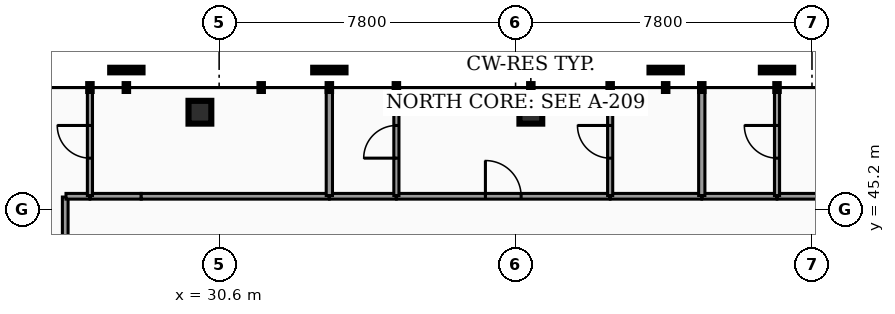
"""IFC4 building model, lengths in metres.
Left out: names, types, materials, properties, quantities, classifications, styles, units other than length and angle.
Written with IfcOpenShell. Run it as: python <this file> out.ifc"""

import sys

from ifc_helpers import new_model, si_unit, direction, frame, frame_2d, origin, origin_2d, place, context, subcontext, project, spatial, rectangle, hollow_rectangle, extrude, element, fill, save


model = new_model("IFC4")
c1 = context("Model", 3, precision=1e-05, world=origin(), true_north=direction((0.0, 1.0)))
c2 = subcontext(c1, "Body", "Model", "MODEL_VIEW")
j1 = project(units=[si_unit("LENGTHUNIT", "METRE"), si_unit("PLANEANGLEUNIT", "RADIAN")], contexts=[c1])
p1 = place(None, origin())
s1 = spatial("IfcSite", under=j1, at=p1, CompositionType="ELEMENT")
p2 = place(p1, origin())
s2 = spatial("IfcBuilding", under=s1, at=p2, CompositionType="ELEMENT")
p3 = place(p2, frame((0.0, 0.0, 208.76)))
s3 = spatial("IfcBuildingStorey", under=s2, at=p3, CompositionType="ELEMENT", Elevation=208.76)
for number, where, z_axis, x_axis in (
    (1, (38.802, 47.761, 0.0), (0.0, 0.0, 1.0), (1.0, 0.0, 0.0)),
    (2, (30.094, 47.761, 0.0), (0.0, 0.0, 1.0), (1.0, 0.0, 0.0)),
):
    element("IfcColumn", number, at=place(p3, frame(where, z_axis=z_axis, x_axis=x_axis)), inside=s3, PredefinedType="COLUMN", context=c2, shape_type="SweptSolid", body=[
        extrude(hollow_rectangle(XDim=0.6, YDim=0.6, WallThickness=0.03, at=origin_2d()), origin(), (0.0, 0.0, 1.0), 3.18),
    ])
p4 = place(p3, frame((26.55, 43.55, 0.0), z_axis=(0.0, 0.0, 1.0), x_axis=(0.0, 1.0, 0.0)))
e3 = element("IfcWall", 3, at=p4, inside=s3, PredefinedType="PARTITIONING", context=c2, shape_type="SweptSolid", body=[
    extrude(rectangle(XDim=1.98, YDim=0.15, at=frame_2d((0.99, 0.0))), origin(), (0.0, 0.0, 1.0), 2.235),
])
p5 = place(p3, frame((26.57, 45.55, 0.0), z_axis=(0.0, 0.0, 1.0), x_axis=(1.0, 0.0, 0.0)))
e4 = element("IfcWall", 4, at=p5, inside=s3, PredefinedType="PARTITIONING", context=c2, shape_type="SweptSolid", body=[
    extrude(rectangle(XDim=0.625, YDim=0.15, at=frame_2d((0.312, 0.0))), origin(), (0.0, 0.0, 1.0), 2.235),
])
p6 = place(p3, frame((27.205, 45.55, 0.0), z_axis=(0.0, 0.0, 1.0), x_axis=(1.0, 0.0, 0.0)))
e5 = element("IfcWall", 5, at=p6, inside=s3, PredefinedType="PARTITIONING", context=c2, shape_type="SweptSolid", body=[
    extrude(rectangle(XDim=1.345, YDim=0.15, at=frame_2d((0.672, 0.0))), origin(), (0.0, 0.0, 1.0), 2.235),
])
p7 = place(p3, frame((28.55, 45.55, 0.0), z_axis=(0.0, 0.0, 1.0), x_axis=(1.0, 0.0, 0.0)))
e6 = element("IfcWall", 6, at=p7, inside=s3, PredefinedType="PARTITIONING", context=c2, shape_type="SweptSolid", body=[
    extrude(rectangle(XDim=4.945, YDim=0.15, at=frame_2d((2.473, 0.0))), origin(), (0.0, 0.0, 1.0), 2.235),
])
p8 = place(p3, frame((45.285, 45.55, 0.0), z_axis=(0.0, 0.0, 1.0), x_axis=(1.0, 0.0, 0.0)))
e7 = element("IfcWall", 7, at=p8, inside=s3, PredefinedType="PARTITIONING", context=c2, shape_type="SweptSolid", body=[
    extrude(rectangle(XDim=3.065, YDim=0.15, at=frame_2d((1.533, 0.0))), origin(), (0.0, 0.0, 1.0), 2.235),
])
p9 = place(p3, frame((43.305, 45.55, 0.0), z_axis=(0.0, 0.0, 1.0), x_axis=(1.0, 0.0, 0.0)))
e8 = element("IfcWall", 8, at=p9, inside=s3, PredefinedType="PARTITIONING", context=c2, shape_type="SweptSolid", body=[
    extrude(rectangle(XDim=1.97, YDim=0.15, at=frame_2d((0.985, 0.0))), origin(), (0.0, 0.0, 1.0), 2.235),
])
p10 = place(p3, frame((35.269, 45.55, 0.0), z_axis=(0.0, 0.0, 1.0), x_axis=(1.0, 0.0, 0.0)))
e9 = element("IfcWall", 9, at=p10, inside=s3, PredefinedType="PARTITIONING", context=c2, shape_type="SweptSolid", body=[
    extrude(rectangle(XDim=5.615, YDim=0.15, at=frame_2d((2.808, 0.0))), origin(), (0.0, 0.0, 1.0), 2.235),
])
p11 = place(p10, frame((2.338, 0.0, 0.0)))
e10 = element("IfcOpeningElement", 10, at=p11, cuts=e9, PredefinedType="OPENING", context=c2, shape_type="SweptSolid", body=[
    extrude(rectangle(XDim=0.94, YDim=2.05, at=frame_2d((0.47, 1.025))), frame((0.0, 0.085, 0.0), z_axis=(0.0, -1.0, 0.0), x_axis=(1.0, 0.0, 0.0)), (0.0, 0.0, 1.0), 0.17),
])
p12 = place(p3, frame((40.894, 45.55, 0.0), z_axis=(0.0, 0.0, 1.0), x_axis=(1.0, 0.0, 0.0)))
e11 = element("IfcWall", 11, at=p12, inside=s3, PredefinedType="PARTITIONING", context=c2, shape_type="SweptSolid", body=[
    extrude(rectangle(XDim=2.401, YDim=0.15, at=frame_2d((1.2, 0.0))), origin(), (0.0, 0.0, 1.0), 2.235),
])
p13 = place(p3, frame((33.505, 45.55, 0.0), z_axis=(0.0, 0.0, 1.0), x_axis=(1.0, 0.0, 0.0)))
e12 = element("IfcWall", 12, at=p13, inside=s3, PredefinedType="PARTITIONING", context=c2, shape_type="SweptSolid", body=[
    extrude(rectangle(XDim=1.754, YDim=0.15, at=frame_2d((0.877, 0.0))), origin(), (0.0, 0.0, 1.0), 2.235),
])
p14 = place(p3, frame((27.2, 45.57, 0.0), z_axis=(0.0, 0.0, 1.0), x_axis=(0.0, 1.0, 0.0)))
e13 = element("IfcWall", 13, at=p14, inside=s3, PredefinedType="PARTITIONING", context=c2, shape_type="SweptSolid", body=[
    extrude(rectangle(XDim=2.826, YDim=0.135, at=frame_2d((1.413, 0.0))), origin(), (0.0, 0.0, 1.0), 2.235),
])
p15 = place(p14, frame((0.983, 0.0, 0.0)))
e14 = element("IfcOpeningElement", 14, at=p15, cuts=e13, PredefinedType="OPENING", context=c2, shape_type="SweptSolid", body=[
    extrude(rectangle(XDim=0.86, YDim=2.05, at=frame_2d((0.43, 1.025))), frame((0.0, 0.077, 0.0), z_axis=(0.0, -1.0, 0.0), x_axis=(1.0, 0.0, 0.0)), (0.0, 0.0, 1.0), 0.155),
])
p16 = place(p3, frame((33.5, 45.57, 0.0), z_axis=(0.0, 0.0, 1.0), x_axis=(0.0, 1.0, 0.0)))
e15 = element("IfcWall", 15, at=p16, inside=s3, PredefinedType="PARTITIONING", context=c2, shape_type="SweptSolid", body=[
    extrude(rectangle(XDim=2.826, YDim=0.165, at=frame_2d((1.413, 0.0))), origin(), (0.0, 0.0, 1.0), 2.235),
])
p17 = place(p3, frame((45.28, 45.57, 0.0), z_axis=(0.0, 0.0, 1.0), x_axis=(0.0, 1.0, 0.0)))
e16 = element("IfcWall", 16, at=p17, inside=s3, PredefinedType="PARTITIONING", context=c2, shape_type="SweptSolid", body=[
    extrude(rectangle(XDim=2.826, YDim=0.135, at=frame_2d((1.413, 0.0))), origin(), (0.0, 0.0, 1.0), 2.235),
])
p18 = place(p17, frame((0.983, 0.0, 0.0)))
e17 = element("IfcOpeningElement", 17, at=p18, cuts=e16, PredefinedType="OPENING", context=c2, shape_type="SweptSolid", body=[
    extrude(rectangle(XDim=0.86, YDim=2.05, at=frame_2d((0.43, 1.025))), frame((0.0, 0.077, 0.0), z_axis=(0.0, -1.0, 0.0), x_axis=(1.0, 0.0, 0.0)), (0.0, 0.0, 1.0), 0.155),
])
p19 = place(p3, frame((43.3, 45.57, 0.0), z_axis=(0.0, 0.0, 1.0), x_axis=(0.0, 1.0, 0.0)))
e18 = element("IfcWall", 18, at=p19, inside=s3, PredefinedType="PARTITIONING", context=c2, shape_type="SweptSolid", body=[
    extrude(rectangle(XDim=2.826, YDim=0.165, at=frame_2d((1.413, 0.0))), origin(), (0.0, 0.0, 1.0), 2.235),
])
p20 = place(p3, frame((40.889, 45.57, 0.0), z_axis=(0.0, 0.0, 1.0), x_axis=(0.0, 1.0, 0.0)))
e19 = element("IfcWall", 19, at=p20, inside=s3, PredefinedType="PARTITIONING", context=c2, shape_type="SweptSolid", body=[
    extrude(rectangle(XDim=2.826, YDim=0.135, at=frame_2d((1.413, 0.0))), origin(), (0.0, 0.0, 1.0), 2.235),
])
p21 = place(p20, frame((0.983, 0.0, 0.0)))
e20 = element("IfcOpeningElement", 20, at=p21, cuts=e19, PredefinedType="OPENING", context=c2, shape_type="SweptSolid", body=[
    extrude(rectangle(XDim=0.86, YDim=2.05, at=frame_2d((0.43, 1.025))), frame((0.0, 0.077, 0.0), z_axis=(0.0, -1.0, 0.0), x_axis=(1.0, 0.0, 0.0)), (0.0, 0.0, 1.0), 0.155),
])
p22 = place(p3, frame((35.264, 45.57, 0.0), z_axis=(0.0, 0.0, 1.0), x_axis=(0.0, 1.0, 0.0)))
e21 = element("IfcWall", 21, at=p22, inside=s3, PredefinedType="PARTITIONING", context=c2, shape_type="SweptSolid", body=[
    extrude(rectangle(XDim=2.826, YDim=0.135, at=frame_2d((1.413, 0.0))), origin(), (0.0, 0.0, 1.0), 2.235),
])
p23 = place(p22, frame((0.983, 0.0, 0.0)))
e22 = element("IfcOpeningElement", 22, at=p23, cuts=e21, PredefinedType="OPENING", context=c2, shape_type="SweptSolid", body=[
    extrude(rectangle(XDim=0.86, YDim=2.05, at=frame_2d((0.43, 1.025))), frame((0.0, 0.077, 0.0), z_axis=(0.0, -1.0, 0.0), x_axis=(1.0, 0.0, 0.0)), (0.0, 0.0, 1.0), 0.155),
])
p24 = place(p11, origin())
e23 = element("IfcDoor", 23, at=p24, inside=s3, OperationType="SINGLE_SWING_LEFT", PredefinedType="DOOR", context=c2, shape_type="SweptSolid", body=[
    extrude(rectangle(XDim=0.94, YDim=2.05, at=frame_2d((0.47, 1.025))), frame((0.0, 0.025, 0.0), z_axis=(0.0, -1.0, 0.0), x_axis=(1.0, 0.0, 0.0)), (0.0, 0.0, 1.0), 0.05),
])
fill(e10, e23)
p25 = place(p15, origin())
e24 = element("IfcDoor", 24, at=p25, inside=s3, OperationType="SINGLE_SWING_RIGHT", PredefinedType="DOOR", context=c2, shape_type="SweptSolid", body=[
    extrude(rectangle(XDim=0.86, YDim=2.05, at=frame_2d((0.43, 1.025))), frame((0.0, 0.025, 0.0), z_axis=(0.0, -1.0, 0.0), x_axis=(1.0, 0.0, 0.0)), (0.0, 0.0, 1.0), 0.05),
])
fill(e14, e24)
p26 = place(p18, origin())
e25 = element("IfcDoor", 25, at=p26, inside=s3, OperationType="SINGLE_SWING_RIGHT", PredefinedType="DOOR", context=c2, shape_type="SweptSolid", body=[
    extrude(rectangle(XDim=0.86, YDim=2.05, at=frame_2d((0.43, 1.025))), frame((0.0, 0.025, 0.0), z_axis=(0.0, -1.0, 0.0), x_axis=(1.0, 0.0, 0.0)), (0.0, 0.0, 1.0), 0.05),
])
fill(e17, e25)
p27 = place(p21, origin())
e26 = element("IfcDoor", 26, at=p27, inside=s3, OperationType="SINGLE_SWING_RIGHT", PredefinedType="DOOR", context=c2, shape_type="SweptSolid", body=[
    extrude(rectangle(XDim=0.86, YDim=2.05, at=frame_2d((0.43, 1.025))), frame((0.0, 0.025, 0.0), z_axis=(0.0, -1.0, 0.0), x_axis=(1.0, 0.0, 0.0)), (0.0, 0.0, 1.0), 0.05),
])
fill(e20, e26)
p28 = place(p23, origin())
e27 = element("IfcDoor", 27, at=p28, inside=s3, OperationType="SINGLE_SWING_LEFT", PredefinedType="DOOR", context=c2, shape_type="SweptSolid", body=[
    extrude(rectangle(XDim=0.86, YDim=2.05, at=frame_2d((0.43, 1.025))), frame((0.0, 0.025, 0.0), z_axis=(0.0, -1.0, 0.0), x_axis=(1.0, 0.0, 0.0)), (0.0, 0.0, 1.0), 0.05),
])
fill(e22, e27)
save(model, sys.argv[1])
